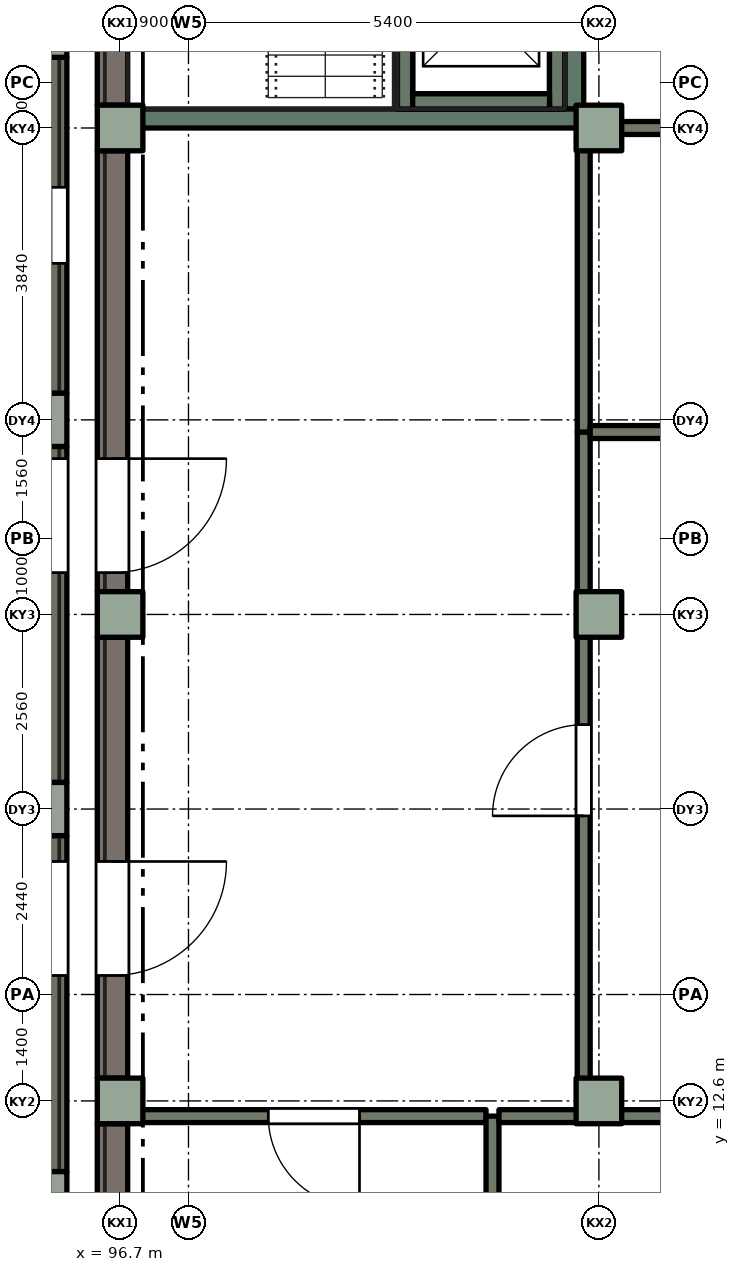
"""IFC4 building model, lengths in metres.
Left out: names, types, materials, properties, quantities, classifications, styles, units other than length and angle.
Written with IfcOpenShell. Run it as: python <this file> out.ifc"""

import sys

from ifc_helpers import new_model, si_unit, direction, frame, frame_2d, origin, origin_2d, place, context, subcontext, project, spatial, rectangle, extrude, element, fill, save


model = new_model("IFC4")
c1 = context("Model", 3, precision=1e-05, world=origin(), true_north=direction((0.0, 1.0)))
c2 = subcontext(c1, "Body", "Model", "MODEL_VIEW")
j1 = project(units=[si_unit("LENGTHUNIT", "METRE"), si_unit("PLANEANGLEUNIT", "RADIAN")], contexts=[c1])
p1 = place(None, origin())
s1 = spatial("IfcSite", under=j1, at=p1, CompositionType="ELEMENT")
p2 = place(p1, origin())
s2 = spatial("IfcBuilding", under=s1, at=p2, CompositionType="ELEMENT")
p3 = place(p2, origin())
s3 = spatial("IfcBuildingStorey", under=s2, at=p3, CompositionType="ELEMENT", Elevation=0.0)
for number, where, z_axis, x_axis in (
    (1, (95.65, 11.32, 0.0), (0.0, 0.0, 1.0), (1.0, 0.0, 0.0)),
    (2, (95.65, 16.44, 0.0), (0.0, 0.0, 1.0), (1.0, 0.0, 0.0)),
    (3, (95.65, 21.56, 0.0), (0.0, 0.0, 1.0), (1.0, 0.0, 0.0)),
    (4, (95.65, 26.68, 0.0), (0.0, 0.0, 1.0), (1.0, 0.0, 0.0)),
):
    element("IfcColumn", number, at=place(p3, frame(where, z_axis=z_axis, x_axis=x_axis)), inside=s3, PredefinedType="COLUMN", context=c2, shape_type="SweptSolid", body=[
        extrude(rectangle(XDim=0.7, YDim=0.7, at=origin_2d()), origin(), (0.0, 0.0, 1.0), 4.2),
    ])
p4 = place(p3, frame((95.8, 11.67, 0.0), z_axis=(0.0, 0.0, 1.0), x_axis=(0.0, 1.0, 0.0)))
e5 = element("IfcWall", 5, at=p4, inside=s3, PredefinedType="SOLIDWALL", context=c2, shape_type="SweptSolid", body=[
    extrude(rectangle(XDim=4.42, YDim=0.4, at=frame_2d((2.21, 0.0))), origin(), (0.0, 0.0, 1.0), 4.2),
])
p5 = place(p4, frame((2.58, 0.0, 0.0)))
e6 = element("IfcOpeningElement", 6, at=p5, cuts=e5, PredefinedType="OPENING", context=c2, shape_type="SweptSolid", body=[
    extrude(rectangle(XDim=1.5, YDim=2.1, at=frame_2d((0.75, 1.05))), frame((0.0, 0.21, 0.0), z_axis=(0.0, -1.0, 0.0), x_axis=(1.0, 0.0, 0.0)), (0.0, 0.0, 1.0), 0.42),
])
p6 = place(p3, frame((95.8, 16.79, 0.0), z_axis=(0.0, 0.0, 1.0), x_axis=(0.0, 1.0, 0.0)))
e7 = element("IfcWall", 7, at=p6, inside=s3, PredefinedType="SOLIDWALL", context=c2, shape_type="SweptSolid", body=[
    extrude(rectangle(XDim=4.42, YDim=0.4, at=frame_2d((2.21, 0.0))), origin(), (0.0, 0.0, 1.0), 4.2),
])
p7 = place(p6, frame((2.76, 0.0, 0.0)))
e8 = element("IfcOpeningElement", 8, at=p7, cuts=e7, PredefinedType="OPENING", context=c2, shape_type="SweptSolid", body=[
    extrude(rectangle(XDim=1.5, YDim=2.1, at=frame_2d((0.75, 1.05))), frame((0.0, 0.21, 0.0), z_axis=(0.0, -1.0, 0.0), x_axis=(1.0, 0.0, 0.0)), (0.0, 0.0, 1.0), 0.42),
])
p8 = place(p3, frame((95.8, 21.91, 0.0), z_axis=(0.0, 0.0, 1.0), x_axis=(0.0, 1.0, 0.0)))
e9 = element("IfcWall", 9, at=p8, inside=s3, PredefinedType="SOLIDWALL", context=c2, shape_type="SweptSolid", body=[
    extrude(rectangle(XDim=4.42, YDim=0.4, at=frame_2d((2.21, 0.0))), origin(), (0.0, 0.0, 1.0), 4.2),
])
p9 = place(p8, frame((1.71, 0.0, 0.9)))
e10 = element("IfcOpeningElement", 10, at=p9, cuts=e9, PredefinedType="OPENING", context=c2, shape_type="SweptSolid", body=[
    extrude(rectangle(XDim=1.0, YDim=2.4, at=frame_2d((0.5, 1.2))), frame((0.0, 0.21, 0.0), z_axis=(0.0, -1.0, 0.0), x_axis=(1.0, 0.0, 0.0)), (0.0, 0.0, 1.0), 0.42),
])
for number, where, z_axis, x_axis in (
    (11, (96.7, 12.6, 0.0), (0.0, 0.0, 1.0), (1.0, 0.0, 0.0)),
    (12, (96.7, 19.0, 0.0), (0.0, 0.0, 1.0), (1.0, 0.0, 0.0)),
    (13, (96.7, 25.4, 0.0), (0.0, 0.0, 1.0), (1.0, 0.0, 0.0)),
    (14, (103.0, 12.6, 0.0), (0.0, 0.0, 1.0), (1.0, 0.0, 0.0)),
    (15, (103.0, 19.0, 0.0), (0.0, 0.0, 1.0), (1.0, 0.0, 0.0)),
    (16, (103.0, 25.4, 0.0), (0.0, 0.0, 1.0), (1.0, 0.0, 0.0)),
):
    element("IfcColumn", number, at=place(p3, frame(where, z_axis=z_axis, x_axis=x_axis)), inside=s3, PredefinedType="COLUMN", context=c2, shape_type="SweptSolid", body=[
        extrude(rectangle(XDim=0.6, YDim=0.6, at=origin_2d()), origin(), (0.0, 0.0, 1.0), 4.2),
    ])
p10 = place(p3, frame((96.6, 12.3, 0.0), z_axis=(0.0, 0.0, 1.0), x_axis=(0.0, -1.0, 0.0)))
e17 = element("IfcWall", 17, at=p10, inside=s3, PredefinedType="SOLIDWALL", context=c2, shape_type="SweptSolid", body=[
    extrude(rectangle(XDim=5.7, YDim=0.4, at=frame_2d((2.85, 0.0))), origin(), (0.0, 0.0, 1.0), 4.2),
])
p11 = place(p3, frame((96.6, 18.7, 0.0), z_axis=(0.0, 0.0, 1.0), x_axis=(0.0, -1.0, 0.0)))
e18 = element("IfcWall", 18, at=p11, inside=s3, PredefinedType="SOLIDWALL", context=c2, shape_type="SweptSolid", body=[
    extrude(rectangle(XDim=5.8, YDim=0.4, at=frame_2d((2.9, 0.0))), origin(), (0.0, 0.0, 1.0), 4.2),
])
p12 = place(p11, frame((2.95, 0.0, 0.0)))
e19 = element("IfcOpeningElement", 19, at=p12, cuts=e18, PredefinedType="OPENING", context=c2, shape_type="SweptSolid", body=[
    extrude(rectangle(XDim=1.5, YDim=2.1, at=frame_2d((0.75, 1.05))), frame((0.0, 0.21, 0.0), z_axis=(0.0, -1.0, 0.0), x_axis=(1.0, 0.0, 0.0)), (0.0, 0.0, 1.0), 0.42),
])
p13 = place(p3, frame((96.6, 25.1, 0.0), z_axis=(0.0, 0.0, 1.0), x_axis=(0.0, -1.0, 0.0)))
e20 = element("IfcWall", 20, at=p13, inside=s3, PredefinedType="SOLIDWALL", context=c2, shape_type="SweptSolid", body=[
    extrude(rectangle(XDim=5.8, YDim=0.4, at=frame_2d((2.9, 0.0))), origin(), (0.0, 0.0, 1.0), 4.2),
])
p14 = place(p13, frame((4.05, 0.0, 0.0)))
e21 = element("IfcOpeningElement", 21, at=p14, cuts=e20, PredefinedType="OPENING", context=c2, shape_type="SweptSolid", body=[
    extrude(rectangle(XDim=1.5, YDim=2.1, at=frame_2d((0.75, 1.05))), frame((0.0, 0.21, 0.0), z_axis=(0.0, -1.0, 0.0), x_axis=(1.0, 0.0, 0.0)), (0.0, 0.0, 1.0), 0.42),
])
p15 = place(p3, frame((96.6, 31.4, 0.0), z_axis=(0.0, 0.0, 1.0), x_axis=(0.0, -1.0, 0.0)))
e22 = element("IfcWall", 22, at=p15, inside=s3, PredefinedType="SOLIDWALL", context=c2, shape_type="SweptSolid", body=[
    extrude(rectangle(XDim=5.7, YDim=0.4, at=frame_2d((2.85, 0.0))), origin(), (0.0, 0.0, 1.0), 4.2),
])
p16 = place(p3, frame((102.675, 25.65, 0.0), z_axis=(0.0, 0.0, 1.0), x_axis=(0.0, 1.0, 0.0)))
e23 = element("IfcWall", 23, at=p16, inside=s3, PredefinedType="SHEAR", context=c2, shape_type="SweptSolid", body=[
    extrude(rectangle(XDim=5.95, YDim=0.25, at=frame_2d((2.975, 0.0))), origin(), (0.0, 0.0, 1.0), 4.2),
])
p17 = place(p16, frame((4.0, 0.0, 0.0)))
e24 = element("IfcOpeningElement", 24, at=p17, cuts=e23, PredefinedType="OPENING", context=c2, shape_type="SweptSolid", body=[
    extrude(rectangle(XDim=1.0, YDim=2.1, at=frame_2d((0.5, 1.05))), frame((0.0, 0.135, 0.0), z_axis=(0.0, -1.0, 0.0), x_axis=(1.0, 0.0, 0.0)), (0.0, 0.0, 1.0), 0.27),
])
p18 = place(p3, frame((96.8, 25.525, 0.0), z_axis=(0.0, 0.0, 1.0), x_axis=(1.0, 0.0, 0.0)))
e25 = element("IfcWall", 25, at=p18, inside=s3, PredefinedType="SHEAR", context=c2, shape_type="SweptSolid", body=[
    extrude(rectangle(XDim=6.0, YDim=0.25, at=frame_2d((3.0, 0.0))), origin(), (0.0, 0.0, 1.0), 4.2),
])
for number, where, z_axis, x_axis in (
    (26, (100.45, 25.65, 0.0), (0.0, 0.0, 1.0), (0.0, 1.0, 0.0)),
    (27, (102.45, 25.65, 0.0), (0.0, 0.0, 1.0), (0.0, 1.0, 0.0)),
):
    element("IfcWall", number, at=place(p3, frame(where, z_axis=z_axis, x_axis=x_axis)), inside=s3, PredefinedType="SHEAR", context=c2, shape_type="SweptSolid", body=[
        extrude(rectangle(XDim=2.65, YDim=0.2, at=frame_2d((1.325, 0.0))), origin(), (0.0, 0.0, 1.0), 4.2),
    ])
p19 = place(p3, frame((100.55, 25.75, 0.0), z_axis=(0.0, 0.0, 1.0), x_axis=(1.0, 0.0, 0.0)))
e28 = element("IfcWall", 28, at=p19, inside=s3, PredefinedType="SHEAR", context=c2, shape_type="SweptSolid", body=[
    extrude(rectangle(XDim=1.8, YDim=0.2, at=frame_2d((0.9, 0.0))), origin(), (0.0, 0.0, 1.0), 4.2),
])
for number, where, z_axis, x_axis in (
    (29, (100.45, 25.65, -1.4), (0.0, 0.0, 1.0), (0.0, 1.0, 0.0)),
    (30, (102.45, 25.65, -1.4), (0.0, 0.0, 1.0), (0.0, 1.0, 0.0)),
):
    element("IfcWall", number, at=place(p3, frame(where, z_axis=z_axis, x_axis=x_axis)), inside=s3, PredefinedType="SHEAR", context=c2, shape_type="SweptSolid", body=[
        extrude(rectangle(XDim=2.65, YDim=0.2, at=frame_2d((1.325, 0.0))), origin(), (0.0, 0.0, 1.0), 1.4),
    ])
p20 = place(p3, frame((100.55, 25.75, -1.4), z_axis=(0.0, 0.0, 1.0), x_axis=(1.0, 0.0, 0.0)))
e31 = element("IfcWall", 31, at=p20, inside=s3, PredefinedType="SHEAR", context=c2, shape_type="SweptSolid", body=[
    extrude(rectangle(XDim=1.8, YDim=0.2, at=frame_2d((0.9, 0.0))), origin(), (0.0, 0.0, 1.0), 1.4),
])
p21 = place(p3, frame((96.8, 12.82, 0.0), z_axis=(0.0, 0.0, 1.0), x_axis=(0.0, -1.0, 0.0)))
e32 = element("IfcWall", 32, at=p21, inside=s3, PredefinedType="PARTITIONING", context=c2, shape_type="SweptSolid", body=[
    extrude(rectangle(XDim=0.42, YDim=0.17, at=frame_2d((0.21, 0.0))), origin(), (0.0, 0.0, 1.0), 3.92),
])
p22 = place(p3, frame((96.8, 19.22, 0.0), z_axis=(0.0, 0.0, 1.0), x_axis=(0.0, -1.0, 0.0)))
e33 = element("IfcWall", 33, at=p22, inside=s3, PredefinedType="PARTITIONING", context=c2, shape_type="SweptSolid", body=[
    extrude(rectangle(XDim=0.44, YDim=0.17, at=frame_2d((0.22, 0.0))), origin(), (0.0, 0.0, 1.0), 3.92),
])
p23 = place(p3, frame((101.515, 12.4, 0.0), z_axis=(0.0, 0.0, 1.0), x_axis=(-1.0, 0.0, 0.0)))
e34 = element("IfcWall", 34, at=p23, inside=s3, PredefinedType="PARTITIONING", context=c2, shape_type="SweptSolid", body=[
    extrude(rectangle(XDim=4.63, YDim=0.17, at=frame_2d((2.315, 0.0))), origin(), (0.0, 0.0, 1.0), 3.92),
])
p24 = place(p23, frame((1.665, 0.0, 0.0)))
e35 = element("IfcOpeningElement", 35, at=p24, cuts=e34, PredefinedType="OPENING", context=c2, shape_type="SweptSolid", body=[
    extrude(rectangle(XDim=1.2, YDim=2.1, at=frame_2d((0.6, 1.05))), frame((0.0, 0.095, 0.0), z_axis=(0.0, -1.0, 0.0), x_axis=(1.0, 0.0, 0.0)), (0.0, 0.0, 1.0), 0.19),
])
p25 = place(p3, frame((101.6, 6.48, 0.0), z_axis=(0.0, 0.0, 1.0), x_axis=(0.0, 1.0, 0.0)))
e36 = element("IfcWall", 36, at=p25, inside=s3, PredefinedType="PARTITIONING", context=c2, shape_type="SweptSolid", body=[
    extrude(rectangle(XDim=5.92, YDim=0.17, at=frame_2d((2.96, 0.0))), origin(), (0.0, 0.0, 1.0), 3.92),
])
p26 = place(p25, frame((2.57, 0.0, 0.0)))
e37 = element("IfcOpeningElement", 37, at=p26, cuts=e36, PredefinedType="OPENING", context=c2, shape_type="SweptSolid", body=[
    extrude(rectangle(XDim=0.8, YDim=2.1, at=frame_2d((0.4, 1.05))), frame((0.0, 0.095, 0.0), z_axis=(0.0, -1.0, 0.0), x_axis=(1.0, 0.0, 0.0)), (0.0, 0.0, 1.0), 0.19),
])
p27 = place(p3, frame((102.8, 12.4, 0.0), z_axis=(0.0, 0.0, 1.0), x_axis=(-1.0, 0.0, 0.0)))
e38 = element("IfcWall", 38, at=p27, inside=s3, PredefinedType="PARTITIONING", context=c2, shape_type="SweptSolid", body=[
    extrude(rectangle(XDim=1.115, YDim=0.17, at=frame_2d((0.558, 0.0))), origin(), (0.0, 0.0, 1.0), 3.92),
])
p28 = place(p3, frame((102.8, 12.485, 0.0), z_axis=(0.0, 0.0, 1.0), x_axis=(0.0, 1.0, 0.0)))
e39 = element("IfcWall", 39, at=p28, inside=s3, PredefinedType="PARTITIONING", context=c2, shape_type="SweptSolid", body=[
    extrude(rectangle(XDim=8.915, YDim=0.17, at=frame_2d((4.458, 0.0))), origin(), (0.0, 0.0, 1.0), 3.92),
])
p29 = place(p28, frame((3.865, 0.0, 0.0)))
e40 = element("IfcOpeningElement", 40, at=p29, cuts=e39, PredefinedType="OPENING", context=c2, shape_type="SweptSolid", body=[
    extrude(rectangle(XDim=1.2, YDim=2.1, at=frame_2d((0.6, 1.05))), frame((0.0, 0.095, 0.0), z_axis=(0.0, -1.0, 0.0), x_axis=(1.0, 0.0, 0.0)), (0.0, 0.0, 1.0), 0.19),
])
p30 = place(p3, frame((102.8, 21.4, 0.0), z_axis=(0.0, 0.0, 1.0), x_axis=(0.0, 1.0, 0.0)))
e41 = element("IfcWall", 41, at=p30, inside=s3, PredefinedType="PARTITIONING", context=c2, shape_type="SweptSolid", body=[
    extrude(rectangle(XDim=3.92, YDim=0.17, at=frame_2d((1.96, 0.0))), origin(), (0.0, 0.0, 1.0), 3.92),
])
p31 = place(p3, frame((105.115, 12.4, 0.0), z_axis=(0.0, 0.0, 1.0), x_axis=(-1.0, 0.0, 0.0)))
e42 = element("IfcWall", 42, at=p31, inside=s3, PredefinedType="PARTITIONING", context=c2, shape_type="SweptSolid", body=[
    extrude(rectangle(XDim=2.23, YDim=0.17, at=frame_2d((1.115, 0.0))), origin(), (0.0, 0.0, 1.0), 3.92),
])
p32 = place(p3, frame((106.4, 25.4, 0.0), z_axis=(0.0, 0.0, 1.0), x_axis=(-1.0, 0.0, 0.0)))
e43 = element("IfcWall", 43, at=p32, inside=s3, PredefinedType="PARTITIONING", context=c2, shape_type="SweptSolid", body=[
    extrude(rectangle(XDim=3.52, YDim=0.17, at=frame_2d((1.76, 0.0))), origin(), (0.0, 0.0, 1.0), 3.92),
])
p33 = place(p32, frame((1.15, 0.0, 0.0)))
e44 = element("IfcOpeningElement", 44, at=p33, cuts=e43, PredefinedType="OPENING", context=c2, shape_type="SweptSolid", body=[
    extrude(rectangle(XDim=1.2, YDim=2.1, at=frame_2d((0.6, 1.05))), frame((0.0, 0.095, 0.0), z_axis=(0.0, -1.0, 0.0), x_axis=(1.0, 0.0, 0.0)), (0.0, 0.0, 1.0), 0.19),
])
p34 = place(p3, frame((108.6, 21.4, 0.0), z_axis=(0.0, 0.0, 1.0), x_axis=(-1.0, 0.0, 0.0)))
e45 = element("IfcWall", 45, at=p34, inside=s3, PredefinedType="PARTITIONING", context=c2, shape_type="SweptSolid", body=[
    extrude(rectangle(XDim=5.715, YDim=0.17, at=frame_2d((2.857, 0.0))), origin(), (0.0, 0.0, 1.0), 3.92),
])
p35 = place(p34, frame((2.25, 0.0, 0.0)))
e46 = element("IfcOpeningElement", 46, at=p35, cuts=e45, PredefinedType="OPENING", context=c2, shape_type="SweptSolid", body=[
    extrude(rectangle(XDim=1.4, YDim=2.1, at=frame_2d((0.7, 1.05))), frame((0.0, 0.095, 0.0), z_axis=(0.0, -1.0, 0.0), x_axis=(1.0, 0.0, 0.0)), (0.0, 0.0, 1.0), 0.19),
])
p36 = place(p5, origin())
e47 = element("IfcDoor", 47, at=p36, inside=s3, OperationType="DOUBLE_DOOR_SINGLE_SWING", PredefinedType="DOOR", context=c2, shape_type="SweptSolid", body=[
    extrude(rectangle(XDim=1.5, YDim=2.1, at=frame_2d((0.75, 1.05))), frame((0.0, 0.025, 0.0), z_axis=(0.0, -1.0, 0.0), x_axis=(1.0, 0.0, 0.0)), (0.0, 0.0, 1.0), 0.05),
])
fill(e6, e47)
p37 = place(p7, origin())
e48 = element("IfcDoor", 48, at=p37, inside=s3, OperationType="DOUBLE_DOOR_SINGLE_SWING", PredefinedType="DOOR", context=c2, shape_type="SweptSolid", body=[
    extrude(rectangle(XDim=1.5, YDim=2.1, at=frame_2d((0.75, 1.05))), frame((0.0, 0.025, 0.0), z_axis=(0.0, -1.0, 0.0), x_axis=(1.0, 0.0, 0.0)), (0.0, 0.0, 1.0), 0.05),
])
fill(e8, e48)
p38 = place(p9, origin())
e49 = element("IfcWindow", 49, at=p38, inside=s3, PartitioningType="SINGLE_PANEL", PredefinedType="WINDOW", context=c2, shape_type="SweptSolid", body=[
    extrude(rectangle(XDim=1.0, YDim=2.4, at=frame_2d((0.5, 1.2))), frame((0.0, 0.03, 0.0), z_axis=(0.0, -1.0, 0.0), x_axis=(1.0, 0.0, 0.0)), (0.0, 0.0, 1.0), 0.06),
])
fill(e10, e49)
p39 = place(p12, origin())
e50 = element("IfcDoor", 50, at=p39, inside=s3, OperationType="DOUBLE_DOOR_SINGLE_SWING", PredefinedType="DOOR", context=c2, shape_type="SweptSolid", body=[
    extrude(rectangle(XDim=1.5, YDim=2.1, at=frame_2d((0.75, 1.05))), frame((0.0, 0.025, 0.0), z_axis=(0.0, -1.0, 0.0), x_axis=(1.0, 0.0, 0.0)), (0.0, 0.0, 1.0), 0.05),
])
fill(e19, e50)
p40 = place(p14, origin())
e51 = element("IfcDoor", 51, at=p40, inside=s3, OperationType="DOUBLE_DOOR_SINGLE_SWING", PredefinedType="DOOR", context=c2, shape_type="SweptSolid", body=[
    extrude(rectangle(XDim=1.5, YDim=2.1, at=frame_2d((0.75, 1.05))), frame((0.0, 0.025, 0.0), z_axis=(0.0, -1.0, 0.0), x_axis=(1.0, 0.0, 0.0)), (0.0, 0.0, 1.0), 0.05),
])
fill(e21, e51)
p41 = place(p24, origin())
e52 = element("IfcDoor", 52, at=p41, inside=s3, OperationType="SINGLE_SWING_LEFT", PredefinedType="DOOR", context=c2, shape_type="SweptSolid", body=[
    extrude(rectangle(XDim=1.2, YDim=2.1, at=frame_2d((0.6, 1.05))), frame((0.0, 0.025, 0.0), z_axis=(0.0, -1.0, 0.0), x_axis=(1.0, 0.0, 0.0)), (0.0, 0.0, 1.0), 0.05),
])
fill(e35, e52)
p42 = place(p29, origin())
e53 = element("IfcDoor", 53, at=p42, inside=s3, OperationType="SINGLE_SWING_LEFT", PredefinedType="DOOR", context=c2, shape_type="SweptSolid", body=[
    extrude(rectangle(XDim=1.2, YDim=2.1, at=frame_2d((0.6, 1.05))), frame((0.0, 0.025, 0.0), z_axis=(0.0, -1.0, 0.0), x_axis=(1.0, 0.0, 0.0)), (0.0, 0.0, 1.0), 0.05),
])
fill(e40, e53)
save(model, sys.argv[1])
